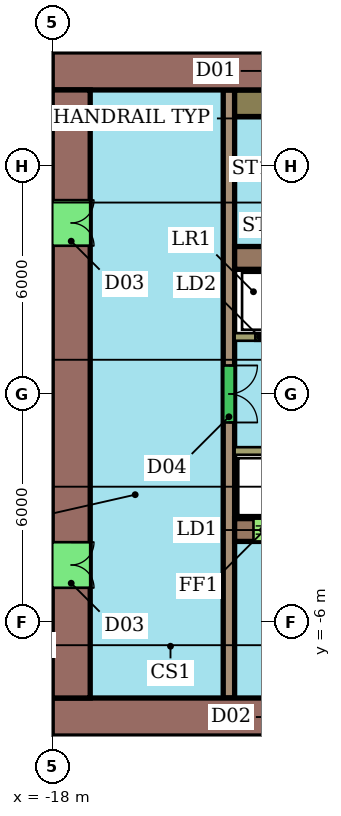
"""IFC4 building model, lengths in metres.
Left out: names, types, materials, properties, quantities, classifications, styles, units other than length and angle.
Written with IfcOpenShell. Run it as: python <this file> out.ifc"""

import sys

from ifc_helpers import new_model, si_unit, direction, frame, frame_2d, origin, place, context, subcontext, project, spatial, rectangle, extrude, element, fill, save


model = new_model("IFC4")
c1 = context("Model", 3, precision=1e-05, world=origin(), true_north=direction((0.0, 1.0)))
c2 = subcontext(c1, "Body", "Model", "MODEL_VIEW")
j1 = project(units=[si_unit("LENGTHUNIT", "METRE"), si_unit("PLANEANGLEUNIT", "RADIAN")], contexts=[c1])
p1 = place(None, origin())
s1 = spatial("IfcSite", under=j1, at=p1, CompositionType="ELEMENT")
p2 = place(p1, origin())
s2 = spatial("IfcBuilding", under=s1, at=p2, CompositionType="ELEMENT")
p3 = place(p2, frame((0.0, 0.0, 80.4)))
s3 = spatial("IfcBuildingStorey", under=s2, at=p3, CompositionType="ELEMENT", Elevation=80.4)
p4 = place(p3, frame((-6.0, 8.5, 0.0), z_axis=(0.0, 0.0, 1.0), x_axis=(-1.0, 0.0, 0.0)))
e1 = element("IfcWall", 1, at=p4, inside=s3, PredefinedType="SHEAR", context=c2, shape_type="SweptSolid", body=[
    extrude(rectangle(XDim=12.0, YDim=1.0, at=frame_2d((6.0, 0.0))), origin(), (0.0, 0.0, 1.0), 3.4),
])
p5 = place(p4, frame((5.2, 0.0, 0.0)))
e2 = element("IfcOpeningElement", 2, at=p5, cuts=e1, PredefinedType="OPENING", context=c2, shape_type="SweptSolid", body=[
    extrude(rectangle(XDim=1.2, YDim=2.1, at=frame_2d((0.6, 1.05))), frame((0.0, 0.51, 0.0), z_axis=(0.0, -1.0, 0.0), x_axis=(1.0, 0.0, 0.0)), (0.0, 0.0, 1.0), 1.02),
])
p6 = place(p3, frame((-18.0, -8.5, 0.0), z_axis=(0.0, 0.0, 1.0), x_axis=(1.0, 0.0, 0.0)))
e3 = element("IfcWall", 3, at=p6, inside=s3, PredefinedType="SHEAR", context=c2, shape_type="SweptSolid", body=[
    extrude(rectangle(XDim=24.0, YDim=1.0, at=frame_2d((12.0, 0.0))), origin(), (0.0, 0.0, 1.0), 3.4),
])
p7 = place(p6, frame((6.0, 0.0, 0.0)))
e4 = element("IfcOpeningElement", 4, at=p7, cuts=e3, PredefinedType="OPENING", context=c2, shape_type="SweptSolid", body=[
    extrude(rectangle(XDim=1.2, YDim=2.1, at=frame_2d((0.6, 1.05))), frame((0.0, 0.51, 0.0), z_axis=(0.0, -1.0, 0.0), x_axis=(1.0, 0.0, 0.0)), (0.0, 0.0, 1.0), 1.02),
])
p8 = place(p3, frame((-17.5, 8.0, 0.0), z_axis=(0.0, 0.0, 1.0), x_axis=(0.0, -1.0, 0.0)))
e5 = element("IfcWall", 5, at=p8, inside=s3, PredefinedType="SHEAR", context=c2, shape_type="SweptSolid", body=[
    extrude(rectangle(XDim=16.0, YDim=1.0, at=frame_2d((8.0, 0.0))), origin(), (0.0, 0.0, 1.0), 3.4),
])
p9 = place(p8, frame((11.9, 0.0, 0.0)))
e6 = element("IfcOpeningElement", 6, at=p9, cuts=e5, PredefinedType="OPENING", context=c2, shape_type="SweptSolid", body=[
    extrude(rectangle(XDim=1.2, YDim=2.1, at=frame_2d((0.6, 1.05))), frame((0.0, 0.51, 0.0), z_axis=(0.0, -1.0, 0.0), x_axis=(1.0, 0.0, 0.0)), (0.0, 0.0, 1.0), 1.02),
])
p10 = place(p8, frame((2.9, 0.0, 0.0)))
e7 = element("IfcOpeningElement", 7, at=p10, cuts=e5, PredefinedType="OPENING", context=c2, shape_type="SweptSolid", body=[
    extrude(rectangle(XDim=1.2, YDim=2.1, at=frame_2d((0.6, 1.05))), frame((0.0, 0.51, 0.0), z_axis=(0.0, -1.0, 0.0), x_axis=(1.0, 0.0, 0.0)), (0.0, 0.0, 1.0), 1.02),
])
p11 = place(p3, frame((-13.2, 3.58, 0.0), z_axis=(0.0, 0.0, 1.0), x_axis=(1.0, 0.0, 0.0)))
e8 = element("IfcWall", 8, at=p11, inside=s3, PredefinedType="SHEAR", context=c2, shape_type="SweptSolid", body=[
    extrude(rectangle(XDim=7.2, YDim=0.6, at=frame_2d((3.6, 0.0))), origin(), (0.0, 0.0, 1.0), 3.4),
])
p12 = place(p3, frame((-13.2, -3.58, 0.0), z_axis=(0.0, 0.0, 1.0), x_axis=(1.0, 0.0, 0.0)))
e9 = element("IfcWall", 9, at=p12, inside=s3, PredefinedType="SHEAR", context=c2, shape_type="SweptSolid", body=[
    extrude(rectangle(XDim=7.2, YDim=0.6, at=frame_2d((3.6, 0.0))), origin(), (0.0, 0.0, 1.0), 3.4),
])
p13 = place(p12, frame((0.496, 0.0, 0.0)))
e10 = element("IfcOpeningElement", 10, at=p13, cuts=e9, PredefinedType="OPENING", context=c2, shape_type="SweptSolid", body=[
    extrude(rectangle(XDim=1.2, YDim=2.1, at=frame_2d((0.6, 1.05))), frame((0.0, 0.31, 0.0), z_axis=(0.0, -1.0, 0.0), x_axis=(1.0, 0.0, 0.0)), (0.0, 0.0, 1.0), 0.62),
])
p14 = place(p12, frame((2.938, 0.0, 0.0)))
e11 = element("IfcOpeningElement", 11, at=p14, cuts=e9, PredefinedType="OPENING", context=c2, shape_type="SweptSolid", body=[
    extrude(rectangle(XDim=1.2, YDim=2.1, at=frame_2d((0.6, 1.05))), frame((0.0, 0.31, 0.0), z_axis=(0.0, -1.0, 0.0), x_axis=(1.0, 0.0, 0.0)), (0.0, 0.0, 1.0), 0.62),
])
p15 = place(p3, frame((-13.35, 8.0, 0.0), z_axis=(0.0, 0.0, 1.0), x_axis=(0.0, -1.0, 0.0)))
e12 = element("IfcWall", 12, at=p15, inside=s3, PredefinedType="SHEAR", context=c2, shape_type="SweptSolid", body=[
    extrude(rectangle(XDim=16.0, YDim=0.3, at=frame_2d((8.0, 0.0))), origin(), (0.0, 0.0, 1.0), 3.4),
])
p16 = place(p15, frame((7.25, 0.0, 0.0)))
e13 = element("IfcOpeningElement", 13, at=p16, cuts=e12, PredefinedType="OPENING", context=c2, shape_type="SweptSolid", body=[
    extrude(rectangle(XDim=1.5, YDim=2.1, at=frame_2d((0.75, 1.05))), frame((0.0, 0.16, 0.0), z_axis=(0.0, -1.0, 0.0), x_axis=(1.0, 0.0, 0.0)), (0.0, 0.0, 1.0), 0.32),
])
p17 = place(p3, frame((-13.2, 1.5, 0.0), z_axis=(0.0, 0.0, 1.0), x_axis=(1.0, 0.0, 0.0)))
e14 = element("IfcWall", 14, at=p17, inside=s3, PredefinedType="SHEAR", context=c2, shape_type="SweptSolid", body=[
    extrude(rectangle(XDim=14.4, YDim=0.2, at=frame_2d((7.2, 0.0))), origin(), (0.0, 0.0, 1.0), 3.4),
])
p18 = place(p17, frame((0.546, 0.0, 0.0)))
e15 = element("IfcOpeningElement", 15, at=p18, cuts=e14, PredefinedType="OPENING", context=c2, shape_type="SweptSolid", body=[
    extrude(rectangle(XDim=1.1, YDim=2.1, at=frame_2d((0.55, 1.05))), frame((0.0, 0.11, 0.0), z_axis=(0.0, -1.0, 0.0), x_axis=(1.0, 0.0, 0.0)), (0.0, 0.0, 1.0), 0.22),
])
p19 = place(p17, frame((2.988, 0.0, 0.0)))
e16 = element("IfcOpeningElement", 16, at=p19, cuts=e14, PredefinedType="OPENING", context=c2, shape_type="SweptSolid", body=[
    extrude(rectangle(XDim=1.1, YDim=2.1, at=frame_2d((0.55, 1.05))), frame((0.0, 0.11, 0.0), z_axis=(0.0, -1.0, 0.0), x_axis=(1.0, 0.0, 0.0)), (0.0, 0.0, 1.0), 0.22),
])
p20 = place(p17, frame((5.429, 0.0, 0.0)))
e17 = element("IfcOpeningElement", 17, at=p20, cuts=e14, PredefinedType="OPENING", context=c2, shape_type="SweptSolid", body=[
    extrude(rectangle(XDim=1.1, YDim=2.1, at=frame_2d((0.55, 1.05))), frame((0.0, 0.11, 0.0), z_axis=(0.0, -1.0, 0.0), x_axis=(1.0, 0.0, 0.0)), (0.0, 0.0, 1.0), 0.22),
])
p21 = place(p17, frame((7.871, 0.0, 0.0)))
e18 = element("IfcOpeningElement", 18, at=p21, cuts=e14, PredefinedType="OPENING", context=c2, shape_type="SweptSolid", body=[
    extrude(rectangle(XDim=1.1, YDim=2.1, at=frame_2d((0.55, 1.05))), frame((0.0, 0.11, 0.0), z_axis=(0.0, -1.0, 0.0), x_axis=(1.0, 0.0, 0.0)), (0.0, 0.0, 1.0), 0.22),
])
p22 = place(p17, frame((13.35, 0.0, 0.0)))
e19 = element("IfcOpeningElement", 19, at=p22, cuts=e14, PredefinedType="OPENING", context=c2, shape_type="SweptSolid", body=[
    extrude(rectangle(XDim=0.9, YDim=2.1, at=frame_2d((0.45, 1.05))), frame((0.0, 0.11, 0.0), z_axis=(0.0, -1.0, 0.0), x_axis=(1.0, 0.0, 0.0)), (0.0, 0.0, 1.0), 0.22),
])
p23 = place(p3, frame((1.2, -1.5, 0.0), z_axis=(0.0, 0.0, 1.0), x_axis=(-1.0, 0.0, 0.0)))
e20 = element("IfcWall", 20, at=p23, inside=s3, PredefinedType="SHEAR", context=c2, shape_type="SweptSolid", body=[
    extrude(rectangle(XDim=14.4, YDim=0.2, at=frame_2d((7.2, 0.0))), origin(), (0.0, 0.0, 1.0), 3.4),
])
p24 = place(p23, frame((7.821, 0.0, 0.0)))
e21 = element("IfcOpeningElement", 21, at=p24, cuts=e20, PredefinedType="OPENING", context=c2, shape_type="SweptSolid", body=[
    extrude(rectangle(XDim=1.2, YDim=2.1, at=frame_2d((0.6, 1.05))), frame((0.0, 0.11, 0.0), z_axis=(0.0, -1.0, 0.0), x_axis=(1.0, 0.0, 0.0)), (0.0, 0.0, 1.0), 0.22),
])
p25 = place(p23, frame((0.15, 0.0, 0.0)))
e22 = element("IfcOpeningElement", 22, at=p25, cuts=e20, PredefinedType="OPENING", context=c2, shape_type="SweptSolid", body=[
    extrude(rectangle(XDim=0.9, YDim=2.1, at=frame_2d((0.45, 1.05))), frame((0.0, 0.11, 0.0), z_axis=(0.0, -1.0, 0.0), x_axis=(1.0, 0.0, 0.0)), (0.0, 0.0, 1.0), 0.22),
])
p26 = place(p3, frame((-13.2, 7.65, 0.0), z_axis=(0.0, 0.0, 1.0), x_axis=(1.0, 0.0, 0.0)))
e23 = element("IfcWall", 23, at=p26, inside=s3, PredefinedType="SHEAR", context=c2, shape_type="SweptSolid", body=[
    extrude(rectangle(XDim=0.8, YDim=0.7, at=frame_2d((0.4, 0.0))), origin(), (0.0, 0.0, 1.0), 3.4),
])
p27 = place(p9, origin())
e24 = element("IfcDoor", 24, at=p27, inside=s3, OperationType="DOUBLE_DOOR_SINGLE_SWING", PredefinedType="NOTDEFINED", context=c2, shape_type="SweptSolid", body=[
    extrude(rectangle(XDim=1.2, YDim=2.1, at=frame_2d((0.6, 1.05))), frame((0.0, 0.025, 0.0), z_axis=(0.0, -1.0, 0.0), x_axis=(1.0, 0.0, 0.0)), (0.0, 0.0, 1.0), 0.05),
])
fill(e6, e24)
p28 = place(p10, origin())
e25 = element("IfcDoor", 25, at=p28, inside=s3, OperationType="DOUBLE_DOOR_SINGLE_SWING", PredefinedType="NOTDEFINED", context=c2, shape_type="SweptSolid", body=[
    extrude(rectangle(XDim=1.2, YDim=2.1, at=frame_2d((0.6, 1.05))), frame((0.0, 0.025, 0.0), z_axis=(0.0, -1.0, 0.0), x_axis=(1.0, 0.0, 0.0)), (0.0, 0.0, 1.0), 0.05),
])
fill(e7, e25)
p29 = place(p13, origin())
e26 = element("IfcDoor", 26, at=p29, inside=s3, OperationType="DOUBLE_DOOR_SLIDING", PredefinedType="NOTDEFINED", context=c2, shape_type="SweptSolid", body=[
    extrude(rectangle(XDim=1.2, YDim=2.1, at=frame_2d((0.6, 1.05))), frame((0.0, 0.025, 0.0), z_axis=(0.0, -1.0, 0.0), x_axis=(1.0, 0.0, 0.0)), (0.0, 0.0, 1.0), 0.05),
])
fill(e10, e26)
p30 = place(p16, origin())
e27 = element("IfcDoor", 27, at=p30, inside=s3, OperationType="DOUBLE_DOOR_SINGLE_SWING", PredefinedType="NOTDEFINED", context=c2, shape_type="SweptSolid", body=[
    extrude(rectangle(XDim=1.5, YDim=2.1, at=frame_2d((0.75, 1.05))), frame((0.0, 0.025, 0.0), z_axis=(0.0, -1.0, 0.0), x_axis=(1.0, 0.0, 0.0)), (0.0, 0.0, 1.0), 0.05),
])
fill(e13, e27)
p31 = place(p18, origin())
e28 = element("IfcDoor", 28, at=p31, inside=s3, OperationType="DOUBLE_DOOR_SLIDING", PredefinedType="NOTDEFINED", context=c2, shape_type="SweptSolid", body=[
    extrude(rectangle(XDim=1.1, YDim=2.1, at=frame_2d((0.55, 1.05))), frame((0.0, 0.025, 0.0), z_axis=(0.0, -1.0, 0.0), x_axis=(1.0, 0.0, 0.0)), (0.0, 0.0, 1.0), 0.05),
])
fill(e15, e28)
save(model, sys.argv[1])
